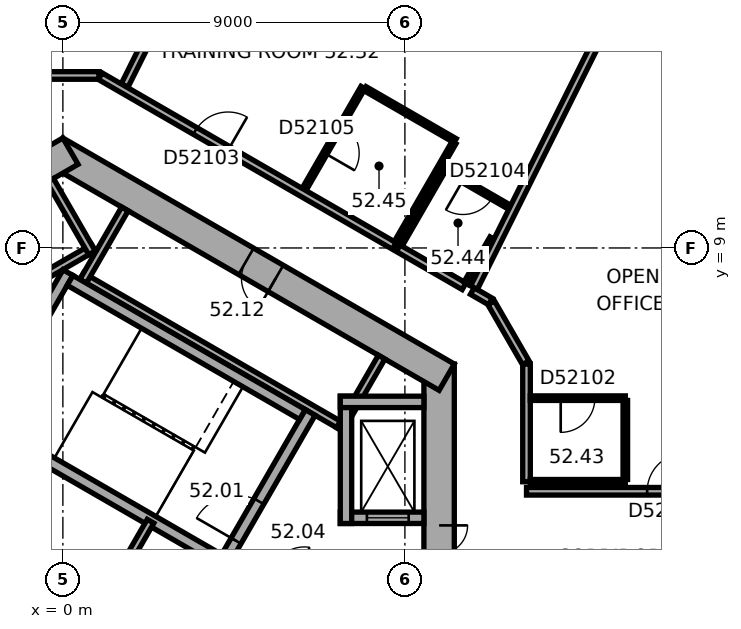
"""IFC4 building model, lengths in metres.
Left out: names, types, materials, properties, quantities, classifications, styles, units other than length and angle.
Written with IfcOpenShell. Run it as: python <this file> out.ifc"""

import sys

from ifc_helpers import new_model, si_unit, direction, frame, frame_2d, origin, place, context, subcontext, project, spatial, rectangle, extrude, element, fill, save


model = new_model("IFC4")
c1 = context("Model", 3, precision=1e-05, world=origin(), true_north=direction((0.0, 1.0)))
c2 = subcontext(c1, "Body", "Model", "MODEL_VIEW")
j1 = project(units=[si_unit("LENGTHUNIT", "METRE"), si_unit("PLANEANGLEUNIT", "RADIAN")], contexts=[c1])
p1 = place(None, origin())
s1 = spatial("IfcSite", under=j1, at=p1, CompositionType="ELEMENT")
p2 = place(p1, origin())
s2 = spatial("IfcBuilding", under=s1, at=p2, CompositionType="ELEMENT")
p3 = place(p2, frame((0.0, 0.0, 210.6)))
s3 = spatial("IfcBuildingStorey", under=s2, at=p3, CompositionType="ELEMENT", Elevation=210.6)
p4 = place(p3, frame((9.9, -5.947, 0.0), z_axis=(0.0, 0.0, 1.0), x_axis=(0.0, 1.0, 0.0)))
e1 = element("IfcWall", 1, at=p4, inside=s3, PredefinedType="SHEAR", context=c2, shape_type="SweptSolid", body=[
    extrude(rectangle(XDim=11.894, YDim=0.8, at=frame_2d((5.947, 0.0))), origin(), (0.0, 0.0, 1.0), 3.7),
])
p5 = place(p4, frame((6.147, 0.0, 0.0)))
e2 = element("IfcOpeningElement", 2, at=p5, cuts=e1, PredefinedType="OPENING", context=c2, shape_type="SweptSolid", body=[
    extrude(rectangle(XDim=1.5, YDim=2.1, at=frame_2d((0.75, 1.05))), frame((0.0, 0.41, 0.0), z_axis=(0.0, -1.0, 0.0), x_axis=(1.0, 0.0, 0.0)), (0.0, 0.0, 1.0), 0.82),
])
p6 = place(p4, frame((1.697, 0.0, 0.0)))
e3 = element("IfcOpeningElement", 3, at=p6, cuts=e1, PredefinedType="OPENING", context=c2, shape_type="SweptSolid", body=[
    extrude(rectangle(XDim=0.9, YDim=2.1, at=frame_2d((0.45, 1.05))), frame((0.0, 0.41, 0.0), z_axis=(0.0, -1.0, 0.0), x_axis=(1.0, 0.0, 0.0)), (0.0, 0.0, 1.0), 0.82),
])
p7 = place(p4, frame((4.297, 0.0, 0.0)))
e4 = element("IfcOpeningElement", 4, at=p7, cuts=e1, PredefinedType="OPENING", context=c2, shape_type="SweptSolid", body=[
    extrude(rectangle(XDim=0.9, YDim=2.1, at=frame_2d((0.45, 1.05))), frame((0.0, 0.41, 0.0), z_axis=(0.0, -1.0, 0.0), x_axis=(1.0, 0.0, 0.0)), (0.0, 0.0, 1.0), 0.82),
])
p8 = place(p3, frame((10.1, 5.6, 0.0), z_axis=(0.0, 0.0, 1.0), x_axis=(-0.866023897231, 0.500002609418, 0.0)))
e5 = element("IfcWall", 5, at=p8, inside=s3, PredefinedType="SHEAR", context=c2, shape_type="SweptSolid", body=[
    extrude(rectangle(XDim=11.894, YDim=0.8, at=frame_2d((5.947, 0.0))), origin(), (0.0, 0.0, 1.0), 3.7),
])
p9 = place(p8, frame((5.197, 0.0, 0.0)))
e6 = element("IfcOpeningElement", 6, at=p9, cuts=e5, PredefinedType="OPENING", context=c2, shape_type="SweptSolid", body=[
    extrude(rectangle(XDim=0.9, YDim=2.1, at=frame_2d((0.45, 1.05))), frame((0.0, 0.41, 0.0), z_axis=(0.0, -1.0, 0.0), x_axis=(1.0, 0.0, 0.0)), (0.0, 0.0, 1.0), 0.82),
])
p10 = place(p3, frame((0.2, 11.547, 0.0), z_axis=(0.0, 0.0, 1.0), x_axis=(-0.866023897231, -0.500002609418, 0.0)))
e7 = element("IfcWall", 7, at=p10, inside=s3, PredefinedType="SHEAR", context=c2, shape_type="SweptSolid", body=[
    extrude(rectangle(XDim=11.894, YDim=0.8, at=frame_2d((5.947, 0.0))), origin(), (0.0, 0.0, 1.0), 3.7),
])
p11 = place(p10, frame((6.147, 0.0, 0.0)))
e8 = element("IfcOpeningElement", 8, at=p11, cuts=e7, PredefinedType="OPENING", context=c2, shape_type="SweptSolid", body=[
    extrude(rectangle(XDim=1.5, YDim=2.1, at=frame_2d((0.75, 1.05))), frame((0.0, 0.41, 0.0), z_axis=(0.0, -1.0, 0.0), x_axis=(1.0, 0.0, 0.0)), (0.0, 0.0, 1.0), 0.82),
])
p12 = place(p10, frame((2.997, 0.0, 0.0)))
e9 = element("IfcOpeningElement", 9, at=p12, cuts=e7, PredefinedType="OPENING", context=c2, shape_type="SweptSolid", body=[
    extrude(rectangle(XDim=0.9, YDim=2.1, at=frame_2d((0.45, 1.05))), frame((0.0, 0.41, 0.0), z_axis=(0.0, -1.0, 0.0), x_axis=(1.0, 0.0, 0.0)), (0.0, 0.0, 1.0), 0.82),
])
p13 = place(p3, frame((18.299, 13.727, 0.0), z_axis=(0.0, 0.0, 1.0), x_axis=(-0.894934554817, 0.44619742558, 0.0)))
e10 = element("IfcWall", 10, at=p13, inside=s3, PredefinedType="STANDARD", context=c2, shape_type="SweptSolid", body=[
    extrude(rectangle(XDim=18.841, YDim=0.2, at=frame_2d((9.421, 0.0))), origin(), (0.0, 0.0, 1.0), 3.7),
])
p14 = place(p13, frame((1.253, 0.0, 0.9)))
e11 = element("IfcOpeningElement", 11, at=p14, cuts=e10, PredefinedType="OPENING", context=c2, shape_type="SweptSolid", body=[
    extrude(rectangle(XDim=2.2, YDim=2.0, at=frame_2d((1.1, 1.0))), frame((0.0, 0.11, 0.0), z_axis=(0.0, -1.0, 0.0), x_axis=(1.0, 0.0, 0.0)), (0.0, 0.0, 1.0), 0.22),
])
p15 = place(p13, frame((4.786, 0.0, 0.9)))
e12 = element("IfcOpeningElement", 12, at=p15, cuts=e10, PredefinedType="OPENING", context=c2, shape_type="SweptSolid", body=[
    extrude(rectangle(XDim=2.2, YDim=2.0, at=frame_2d((1.1, 1.0))), frame((0.0, 0.11, 0.0), z_axis=(0.0, -1.0, 0.0), x_axis=(1.0, 0.0, 0.0)), (0.0, 0.0, 1.0), 0.22),
])
p16 = place(p13, frame((8.32, 0.0, 0.9)))
e13 = element("IfcOpeningElement", 13, at=p16, cuts=e10, PredefinedType="OPENING", context=c2, shape_type="SweptSolid", body=[
    extrude(rectangle(XDim=2.2, YDim=2.0, at=frame_2d((1.1, 1.0))), frame((0.0, 0.11, 0.0), z_axis=(0.0, -1.0, 0.0), x_axis=(1.0, 0.0, 0.0)), (0.0, 0.0, 1.0), 0.22),
])
p17 = place(p13, frame((11.854, 0.0, 0.9)))
e14 = element("IfcOpeningElement", 14, at=p17, cuts=e10, PredefinedType="OPENING", context=c2, shape_type="SweptSolid", body=[
    extrude(rectangle(XDim=2.2, YDim=2.0, at=frame_2d((1.1, 1.0))), frame((0.0, 0.11, 0.0), z_axis=(0.0, -1.0, 0.0), x_axis=(1.0, 0.0, 0.0)), (0.0, 0.0, 1.0), 0.22),
])
p18 = place(p13, frame((15.387, 0.0, 0.9)))
e15 = element("IfcOpeningElement", 15, at=p18, cuts=e10, PredefinedType="OPENING", context=c2, shape_type="SweptSolid", body=[
    extrude(rectangle(XDim=2.2, YDim=2.0, at=frame_2d((1.1, 1.0))), frame((0.0, 0.11, 0.0), z_axis=(0.0, -1.0, 0.0), x_axis=(1.0, 0.0, 0.0)), (0.0, 0.0, 1.0), 0.22),
])
p19 = place(p3, frame((7.424, 4.259, 0.0), z_axis=(0.0, 0.0, 1.0), x_axis=(-0.866026010844, 0.49999894854, 0.0)))
e16 = element("IfcWall", 16, at=p19, inside=s3, PredefinedType="PARTITIONING", context=c2, shape_type="SweptSolid", body=[
    extrude(rectangle(XDim=8.0, YDim=0.2, at=frame_2d((4.0, 0.0))), origin(), (0.0, 0.0, 1.0), 3.35),
])
for number, where, z_axis, x_axis in (
    (17, (7.287, 4.222, 0.0), (0.0, 0.0, 1.0), (0.5, 0.866, 0.0)),
    (18, (0.532, 8.122, 0.0), (0.0, 0.0, 1.0), (0.5, 0.866, 0.0)),
):
    element("IfcWall", number, at=place(p3, frame(where, z_axis=z_axis, x_axis=x_axis)), inside=s3, PredefinedType="PARTITIONING", context=c2, shape_type="SweptSolid", body=[
        extrude(rectangle(XDim=2.2, YDim=0.2, at=frame_2d((1.1, 0.0))), origin(), (0.0, 0.0, 1.0), 3.35),
    ])
p20 = place(p3, frame((0.803, 9.009, 0.0), z_axis=(0.0, 0.0, 1.0), x_axis=(-0.866028230842, -0.499995103361, 0.0)))
e19 = element("IfcWall", 19, at=p20, inside=s3, PredefinedType="PARTITIONING", context=c2, shape_type="SweptSolid", body=[
    extrude(rectangle(XDim=5.4, YDim=0.2, at=frame_2d((2.7, 0.0))), origin(), (0.0, 0.0, 1.0), 3.35),
])
p21 = place(p3, frame((0.767, 8.872, 0.0), z_axis=(0.0, 0.0, 1.0), x_axis=(-0.499994660107, 0.866028486751, 0.0)))
e20 = element("IfcWall", 20, at=p21, inside=s3, PredefinedType="PARTITIONING", context=c2, shape_type="SweptSolid", body=[
    extrude(rectangle(XDim=2.2, YDim=0.2, at=frame_2d((1.1, 0.0))), origin(), (0.0, 0.0, 1.0), 3.35),
])
p22 = place(p3, frame((4.158, 0.602, 0.0), z_axis=(0.0, 0.0, 1.0), x_axis=(0.499977259774, 0.866038532462, 0.0)))
e21 = element("IfcWall", 21, at=p22, inside=s3, PredefinedType="SHEAR", context=c2, shape_type="SweptSolid", body=[
    extrude(rectangle(XDim=4.7, YDim=0.3, at=frame_2d((2.35, 0.0))), origin(), (0.0, 0.0, 1.0), 3.35),
])
p23 = place(p22, frame((0.8, 0.0, 0.0)))
e22 = element("IfcOpeningElement", 22, at=p23, cuts=e21, PredefinedType="OPENING", context=c2, shape_type="SweptSolid", body=[
    extrude(rectangle(XDim=1.2, YDim=2.1, at=frame_2d((0.6, 1.05))), frame((0.0, 0.16, 0.0), z_axis=(0.0, -1.0, 0.0), x_axis=(1.0, 0.0, 0.0)), (0.0, 0.0, 1.0), 0.32),
])
p24 = place(p3, frame((-2.216, 4.282, 0.0), z_axis=(0.0, 0.0, 1.0), x_axis=(0.499977259774, 0.866038532462, 0.0)))
e23 = element("IfcWall", 23, at=p24, inside=s3, PredefinedType="SHEAR", context=c2, shape_type="SweptSolid", body=[
    extrude(rectangle(XDim=4.7, YDim=0.3, at=frame_2d((2.35, 0.0))), origin(), (0.0, 0.0, 1.0), 3.35),
])
for number, where, z_axis, x_axis in (
    (24, (4.103, 0.807, 0.0), (0.0, 0.0, 1.0), (-0.866, 0.5, 0.0)),
    (25, (6.303, 4.617, 0.0), (0.0, 0.0, 1.0), (-0.866, 0.5, 0.0)),
):
    element("IfcWall", number, at=place(p3, frame(where, z_axis=z_axis, x_axis=x_axis)), inside=s3, PredefinedType="SHEAR", context=c2, shape_type="SweptSolid", body=[
        extrude(rectangle(XDim=7.06, YDim=0.3, at=frame_2d((3.53, 0.0))), origin(), (0.0, 0.0, 1.0), 3.35),
    ])
p25 = place(p3, frame((7.3, 1.9, 0.0), z_axis=(0.0, 0.0, 1.0), x_axis=(1.0, 0.0, 0.0)))
e26 = element("IfcWall", 26, at=p25, inside=s3, PredefinedType="SHEAR", context=c2, shape_type="SweptSolid", body=[
    extrude(rectangle(XDim=2.2, YDim=0.3, at=frame_2d((1.1, 0.0))), origin(), (0.0, 0.0, 1.0), 3.35),
])
p26 = place(p25, frame((0.7, 0.0, 0.0)))
e27 = element("IfcOpeningElement", 27, at=p26, cuts=e26, PredefinedType="OPENING", context=c2, shape_type="SweptSolid", body=[
    extrude(rectangle(XDim=1.1, YDim=2.1, at=frame_2d((0.55, 1.05))), frame((0.0, 0.16, 0.0), z_axis=(0.0, -1.0, 0.0), x_axis=(1.0, 0.0, 0.0)), (0.0, 0.0, 1.0), 0.32),
])
p27 = place(p3, frame((7.45, 1.75, 0.0), z_axis=(0.0, 0.0, 1.0), x_axis=(0.0, 1.0, 0.0)))
e28 = element("IfcWall", 28, at=p27, inside=s3, PredefinedType="SHEAR", context=c2, shape_type="SweptSolid", body=[
    extrude(rectangle(XDim=3.35, YDim=0.3, at=frame_2d((1.675, 0.0))), origin(), (0.0, 0.0, 1.0), 3.35),
])
p28 = place(p3, frame((7.3, 4.95, 0.0), z_axis=(0.0, 0.0, 1.0), x_axis=(1.0, 0.0, 0.0)))
e29 = element("IfcWall", 29, at=p28, inside=s3, PredefinedType="SHEAR", context=c2, shape_type="SweptSolid", body=[
    extrude(rectangle(XDim=2.2, YDim=0.3, at=frame_2d((1.1, 0.0))), origin(), (0.0, 0.0, 1.0), 3.35),
])
p29 = place(p3, frame((0.74, -0.904, 0.0), z_axis=(0.0, 0.0, 1.0), x_axis=(0.500028278809, 0.866009076391, 0.0)))
e30 = element("IfcWall", 30, at=p29, inside=s3, PredefinedType="PARTITIONING", context=c2, shape_type="SweptSolid", body=[
    extrude(rectangle(XDim=3.133, YDim=0.2, at=frame_2d((1.566, 0.0))), origin(), (0.0, 0.0, 1.0), 3.35),
])
p30 = place(p3, frame((0.95, 13.539, 0.0), z_axis=(0.0, 0.0, 1.0), x_axis=(-1.0, 0.0, 0.0)))
e31 = element("IfcWall", 31, at=p30, inside=s3, PredefinedType="PARTITIONING", context=c2, shape_type="SweptSolid", body=[
    extrude(rectangle(XDim=1.9, YDim=0.2, at=frame_2d((0.95, 0.0))), origin(), (0.0, 0.0, 1.0), 3.35),
])
p31 = place(p3, frame((4.723, 19.49, 0.0), z_axis=(0.0, 0.0, 1.0), x_axis=(-0.446186614574, -0.894939944898, 0.0)))
e32 = element("IfcWall", 32, at=p31, inside=s3, PredefinedType="PARTITIONING", context=c2, shape_type="SweptSolid", body=[
    extrude(rectangle(XDim=6.944, YDim=0.2, at=frame_2d((3.472, 0.0))), origin(), (0.0, 0.0, 1.0), 2.65),
])
p32 = place(p3, frame((6.347, 10.539, 0.0), z_axis=(0.0, 0.0, 1.0), x_axis=(0.499933790963, 0.866063626216, 0.0)))
e33 = element("IfcWall", 33, at=p32, inside=s3, PredefinedType="PARTITIONING", context=c2, shape_type="SweptSolid", body=[
    extrude(rectangle(XDim=3.1, YDim=0.12, at=frame_2d((1.55, 0.0))), origin(), (0.0, 0.0, 1.0), 3.35),
])
p33 = place(p32, frame((1.1, 0.0, 0.0)))
e34 = element("IfcOpeningElement", 34, at=p33, cuts=e33, PredefinedType="OPENING", context=c2, shape_type="SweptSolid", body=[
    extrude(rectangle(XDim=0.9, YDim=2.1, at=frame_2d((0.45, 1.05))), frame((0.0, 0.07, 0.0), z_axis=(0.0, -1.0, 0.0), x_axis=(1.0, 0.0, 0.0)), (0.0, 0.0, 1.0), 0.14),
])
p34 = place(p3, frame((7.948, 13.193, 0.0), z_axis=(0.0, 0.0, 1.0), x_axis=(0.866019409031, -0.500010383074, 0.0)))
e35 = element("IfcWall", 35, at=p34, inside=s3, PredefinedType="PARTITIONING", context=c2, shape_type="SweptSolid", body=[
    extrude(rectangle(XDim=2.74, YDim=0.12, at=frame_2d((1.37, 0.0))), origin(), (0.0, 0.0, 1.0), 3.35),
])
p35 = place(p3, frame((8.721, 9.052, 0.0), z_axis=(0.0, 0.0, 1.0), x_axis=(-0.866028125821, 0.499995285264, 0.0)))
e36 = element("IfcWall", 36, at=p35, inside=s3, PredefinedType="PARTITIONING", context=c2, shape_type="SweptSolid", body=[
    extrude(rectangle(XDim=8.934, YDim=0.2, at=frame_2d((4.467, 0.0))), origin(), (0.0, 0.0, 1.0), 3.35),
])
p36 = place(p35, frame((5.05, 0.0, 0.0)))
e37 = element("IfcOpeningElement", 37, at=p36, cuts=e36, PredefinedType="OPENING", context=c2, shape_type="SweptSolid", body=[
    extrude(rectangle(XDim=1.0, YDim=2.1, at=frame_2d((0.5, 1.05))), frame((0.0, 0.11, 0.0), z_axis=(0.0, -1.0, 0.0), x_axis=(1.0, 0.0, 0.0)), (0.0, 0.0, 1.0), 0.22),
])
p37 = place(p3, frame((8.875, 9.079, 0.0), z_axis=(0.0, 0.0, 1.0), x_axis=(0.499998129301, 0.86602648383, 0.0)))
e38 = element("IfcWall", 38, at=p37, inside=s3, PredefinedType="PARTITIONING", context=c2, shape_type="SweptSolid", body=[
    extrude(rectangle(XDim=2.3, YDim=0.12, at=frame_2d((1.15, 0.0))), origin(), (0.0, 0.0, 1.0), 3.35),
])
p38 = place(p3, frame((10.077, 11.04, 0.0), z_axis=(0.0, 0.0, 1.0), x_axis=(0.866043088465, -0.499969367985, 0.0)))
e39 = element("IfcWall", 39, at=p38, inside=s3, PredefinedType="PARTITIONING", context=c2, shape_type="SweptSolid", body=[
    extrude(rectangle(XDim=1.94, YDim=0.12, at=frame_2d((0.97, 0.0))), origin(), (0.0, 0.0, 1.0), 3.35),
])
p39 = place(p38, frame((0.52, 0.0, 0.0)))
e40 = element("IfcOpeningElement", 40, at=p39, cuts=e39, PredefinedType="OPENING", context=c2, shape_type="SweptSolid", body=[
    extrude(rectangle(XDim=0.9, YDim=2.1, at=frame_2d((0.45, 1.05))), frame((0.0, 0.07, 0.0), z_axis=(0.0, -1.0, 0.0), x_axis=(1.0, 0.0, 0.0)), (0.0, 0.0, 1.0), 0.14),
])
p40 = place(p3, frame((10.292, 11.771, 0.0), z_axis=(0.0, 0.0, 1.0), x_axis=(-0.500026023896, -0.86601037836, 0.0)))
e41 = element("IfcWall", 41, at=p40, inside=s3, PredefinedType="PARTITIONING", context=c2, shape_type="SweptSolid", body=[
    extrude(rectangle(XDim=3.04, YDim=0.12, at=frame_2d((1.52, 0.0))), origin(), (0.0, 0.0, 1.0), 3.35),
])
p41 = place(p3, frame((10.558, 7.992, 0.0), z_axis=(0.0, 0.0, 1.0), x_axis=(-0.866041268327, 0.499972520799, 0.0)))
e42 = element("IfcWall", 42, at=p41, inside=s3, PredefinedType="PARTITIONING", context=c2, shape_type="SweptSolid", body=[
    extrude(rectangle(XDim=2.0, YDim=0.2, at=frame_2d((1.0, 0.0))), origin(), (0.0, 0.0, 1.0), 3.35),
])
p42 = place(p3, frame((11.25, 7.592, 0.0), z_axis=(0.0, 0.0, 1.0), x_axis=(-0.865993292597, 0.500055614084, 0.0)))
e43 = element("IfcWall", 43, at=p42, inside=s3, PredefinedType="PARTITIONING", context=c2, shape_type="SweptSolid", body=[
    extrude(rectangle(XDim=0.55, YDim=0.2, at=frame_2d((0.275, 0.0))), origin(), (0.0, 0.0, 1.0), 3.35),
])
p43 = place(p3, frame((11.291, 9.263, 0.0), z_axis=(0.0, 0.0, 1.0), x_axis=(-0.500036664704, -0.866004234373, 0.0)))
e44 = element("IfcWall", 44, at=p43, inside=s3, PredefinedType="PARTITIONING", context=c2, shape_type="SweptSolid", body=[
    extrude(rectangle(XDim=1.368, YDim=0.12, at=frame_2d((0.684, 0.0))), origin(), (0.0, 0.0, 1.0), 3.35),
])
p44 = place(p3, frame((12.18, 5.981, 0.0), z_axis=(0.0, 0.0, 1.0), x_axis=(-0.499904359745, 0.86608061467, 0.0)))
e45 = element("IfcWall", 45, at=p44, inside=s3, PredefinedType="PARTITIONING", context=c2, shape_type="SweptSolid", body=[
    extrude(rectangle(XDim=1.82, YDim=0.2, at=frame_2d((0.91, 0.0))), origin(), (0.0, 0.0, 1.0), 3.35),
])
p45 = place(p3, frame((12.2, 2.848, 0.0), z_axis=(0.0, 0.0, 1.0), x_axis=(0.0, 1.0, 0.0)))
e46 = element("IfcWall", 46, at=p45, inside=s3, PredefinedType="PARTITIONING", context=c2, shape_type="SweptSolid", body=[
    extrude(rectangle(XDim=3.099, YDim=0.2, at=frame_2d((1.549, 0.0))), origin(), (0.0, 0.0, 1.0), 3.35),
])
p46 = place(p3, frame((12.3, 5.048, 0.0), z_axis=(0.0, 0.0, 1.0), x_axis=(1.0, 0.0, 0.0)))
e47 = element("IfcWall", 47, at=p46, inside=s3, PredefinedType="PARTITIONING", context=c2, shape_type="SweptSolid", body=[
    extrude(rectangle(XDim=2.5, YDim=0.12, at=frame_2d((1.25, 0.0))), origin(), (0.0, 0.0, 1.0), 3.35),
])
p47 = place(p46, frame((0.8, 0.0, 0.0)))
e48 = element("IfcOpeningElement", 48, at=p47, cuts=e47, PredefinedType="OPENING", context=c2, shape_type="SweptSolid", body=[
    extrude(rectangle(XDim=0.9, YDim=2.1, at=frame_2d((0.45, 1.05))), frame((0.0, 0.07, 0.0), z_axis=(0.0, -1.0, 0.0), x_axis=(1.0, 0.0, 0.0)), (0.0, 0.0, 1.0), 0.14),
])
p48 = place(p3, frame((14.211, 14.76, 0.0), z_axis=(0.0, 0.0, 1.0), x_axis=(-0.446198490295, -0.89493402397, 0.0)))
e49 = element("IfcWall", 49, at=p48, inside=s3, PredefinedType="PARTITIONING", context=c2, shape_type="SweptSolid", body=[
    extrude(rectangle(XDim=7.602, YDim=0.2, at=frame_2d((3.801, 0.0))), origin(), (0.0, 0.0, 1.0), 3.35),
])
p49 = place(p3, frame((14.8, 2.848, 0.0), z_axis=(0.0, 0.0, 1.0), x_axis=(-1.0, 0.0, 0.0)))
e50 = element("IfcWall", 50, at=p49, inside=s3, PredefinedType="PARTITIONING", context=c2, shape_type="SweptSolid", body=[
    extrude(rectangle(XDim=2.5, YDim=0.12, at=frame_2d((1.25, 0.0))), origin(), (0.0, 0.0, 1.0), 3.35),
])
p50 = place(p3, frame((14.8, 4.988, 0.0), z_axis=(0.0, 0.0, 1.0), x_axis=(0.0, -1.0, 0.0)))
e51 = element("IfcWall", 51, at=p50, inside=s3, PredefinedType="PARTITIONING", context=c2, shape_type="SweptSolid", body=[
    extrude(rectangle(XDim=2.08, YDim=0.12, at=frame_2d((1.04, 0.0))), origin(), (0.0, 0.0, 1.0), 3.35),
])
p51 = place(p3, frame((19.55, 2.598, 0.0), z_axis=(0.0, 0.0, 1.0), x_axis=(-1.0, 0.0, 0.0)))
e52 = element("IfcWall", 52, at=p51, inside=s3, PredefinedType="PARTITIONING", context=c2, shape_type="SweptSolid", body=[
    extrude(rectangle(XDim=7.35, YDim=0.2, at=frame_2d((3.675, 0.0))), origin(), (0.0, 0.0, 1.0), 3.35),
])
p52 = place(p51, frame((3.175, 0.0, 0.0)))
e53 = element("IfcOpeningElement", 53, at=p52, cuts=e52, PredefinedType="OPENING", context=c2, shape_type="SweptSolid", body=[
    extrude(rectangle(XDim=1.0, YDim=2.1, at=frame_2d((0.5, 1.05))), frame((0.0, 0.11, 0.0), z_axis=(0.0, -1.0, 0.0), x_axis=(1.0, 0.0, 0.0)), (0.0, 0.0, 1.0), 0.22),
])
p53 = place(p5, origin())
e54 = element("IfcDoor", 54, at=p53, inside=s3, OperationType="DOUBLE_DOOR_SINGLE_SWING", PredefinedType="DOOR", context=c2, shape_type="SweptSolid", body=[
    extrude(rectangle(XDim=1.5, YDim=2.1, at=frame_2d((0.75, 1.05))), frame((0.0, 0.025, 0.0), z_axis=(0.0, -1.0, 0.0), x_axis=(1.0, 0.0, 0.0)), (0.0, 0.0, 1.0), 0.05),
])
fill(e2, e54)
p54 = place(p23, origin())
e55 = element("IfcDoor", 55, at=p54, inside=s3, OperationType="SINGLE_SWING_RIGHT", PredefinedType="DOOR", context=c2, shape_type="SweptSolid", body=[
    extrude(rectangle(XDim=1.2, YDim=2.1, at=frame_2d((0.6, 1.05))), frame((0.0, 0.025, 0.0), z_axis=(0.0, -1.0, 0.0), x_axis=(1.0, 0.0, 0.0)), (0.0, 0.0, 1.0), 0.05),
])
fill(e22, e55)
p55 = place(p9, origin())
e56 = element("IfcDoor", 56, at=p55, inside=s3, OperationType="SINGLE_SWING_LEFT", PredefinedType="DOOR", context=c2, shape_type="SweptSolid", body=[
    extrude(rectangle(XDim=0.9, YDim=2.1, at=frame_2d((0.45, 1.05))), frame((0.0, 0.025, 0.0), z_axis=(0.0, -1.0, 0.0), x_axis=(1.0, 0.0, 0.0)), (0.0, 0.0, 1.0), 0.05),
])
fill(e6, e56)
p56 = place(p26, origin())
e57 = element("IfcDoor", 57, at=p56, inside=s3, OperationType="DOUBLE_DOOR_SLIDING", PredefinedType="DOOR", context=c2, shape_type="SweptSolid", body=[
    extrude(rectangle(XDim=1.1, YDim=2.1, at=frame_2d((0.55, 1.05))), frame((0.0, 0.025, 0.0), z_axis=(0.0, -1.0, 0.0), x_axis=(1.0, 0.0, 0.0)), (0.0, 0.0, 1.0), 0.05),
])
fill(e27, e57)
p57 = place(p52, origin())
e58 = element("IfcDoor", 58, at=p57, inside=s3, OperationType="SINGLE_SWING_LEFT", PredefinedType="DOOR", context=c2, shape_type="SweptSolid", body=[
    extrude(rectangle(XDim=1.0, YDim=2.1, at=frame_2d((0.5, 1.05))), frame((0.0, 0.025, 0.0), z_axis=(0.0, -1.0, 0.0), x_axis=(1.0, 0.0, 0.0)), (0.0, 0.0, 1.0), 0.05),
])
fill(e53, e58)
p58 = place(p47, origin())
e59 = element("IfcDoor", 59, at=p58, inside=s3, OperationType="SINGLE_SWING_LEFT", PredefinedType="DOOR", context=c2, shape_type="SweptSolid", body=[
    extrude(rectangle(XDim=0.9, YDim=2.1, at=frame_2d((0.45, 1.05))), frame((0.0, 0.025, 0.0), z_axis=(0.0, -1.0, 0.0), x_axis=(1.0, 0.0, 0.0)), (0.0, 0.0, 1.0), 0.05),
])
fill(e48, e59)
p59 = place(p36, origin())
e60 = element("IfcDoor", 60, at=p59, inside=s3, OperationType="SINGLE_SWING_LEFT", PredefinedType="DOOR", context=c2, shape_type="SweptSolid", body=[
    extrude(rectangle(XDim=1.0, YDim=2.1, at=frame_2d((0.5, 1.05))), frame((0.0, 0.025, 0.0), z_axis=(0.0, -1.0, 0.0), x_axis=(1.0, 0.0, 0.0)), (0.0, 0.0, 1.0), 0.05),
])
fill(e37, e60)
p60 = place(p39, origin())
e61 = element("IfcDoor", 61, at=p60, inside=s3, OperationType="SINGLE_SWING_LEFT", PredefinedType="DOOR", context=c2, shape_type="SweptSolid", body=[
    extrude(rectangle(XDim=0.9, YDim=2.1, at=frame_2d((0.45, 1.05))), frame((0.0, 0.025, 0.0), z_axis=(0.0, -1.0, 0.0), x_axis=(1.0, 0.0, 0.0)), (0.0, 0.0, 1.0), 0.05),
])
fill(e40, e61)
p61 = place(p33, origin())
e62 = element("IfcDoor", 62, at=p61, inside=s3, OperationType="SINGLE_SWING_LEFT", PredefinedType="DOOR", context=c2, shape_type="SweptSolid", body=[
    extrude(rectangle(XDim=0.9, YDim=2.1, at=frame_2d((0.45, 1.05))), frame((0.0, 0.025, 0.0), z_axis=(0.0, -1.0, 0.0), x_axis=(1.0, 0.0, 0.0)), (0.0, 0.0, 1.0), 0.05),
])
fill(e34, e62)
save(model, sys.argv[1])
